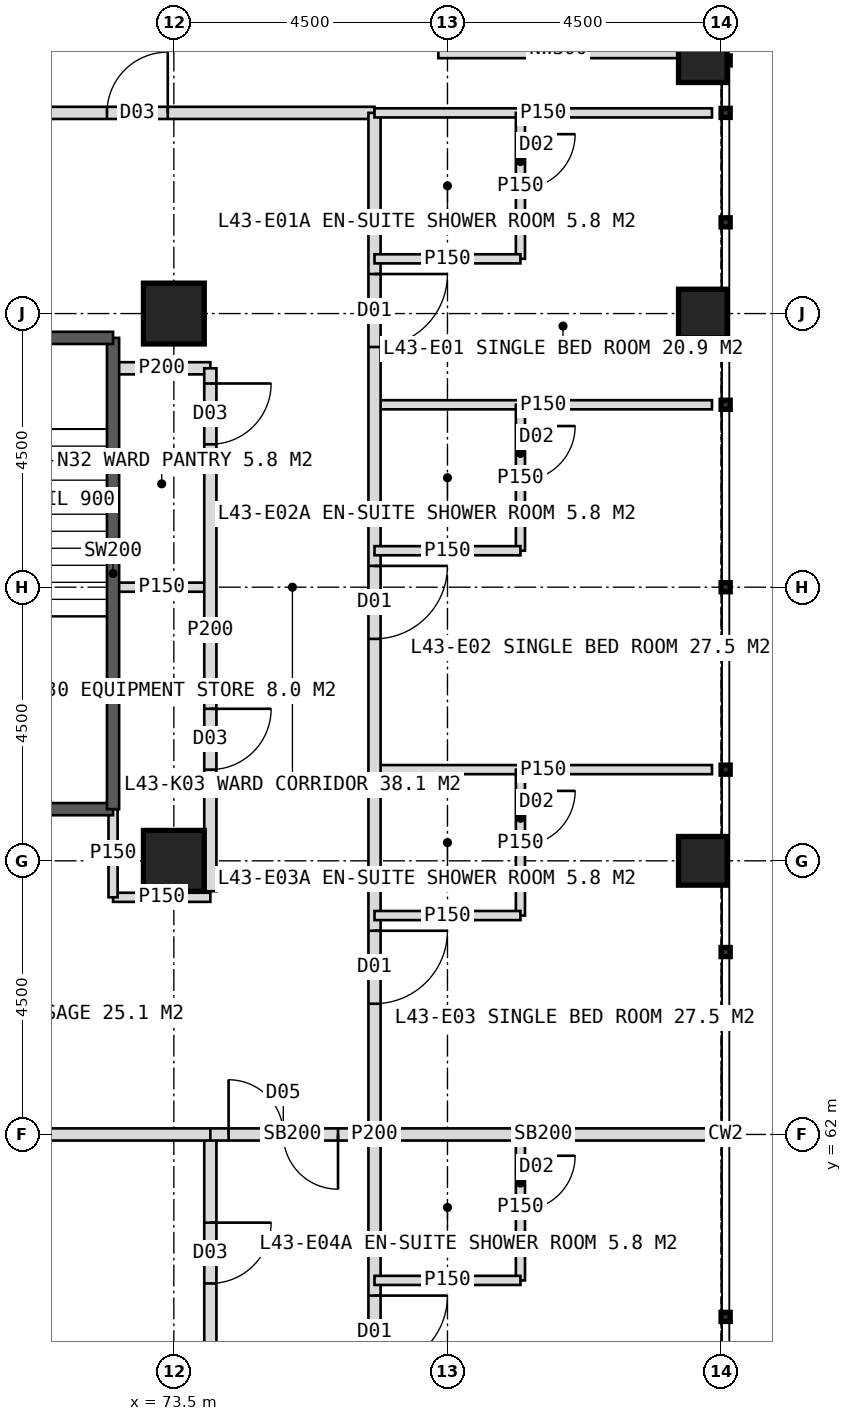
"""IFC4 building model, lengths in metres.
Left out: names, types, materials, properties, quantities, classifications, styles, units other than length and angle.
Written with IfcOpenShell. Run it as: python <this file> out.ifc"""

import sys

from ifc_helpers import new_model, si_unit, direction, frame, frame_2d, origin, origin_2d, place, context, subcontext, project, spatial, rectangle, hollow_rectangle, extrude, element, fill, save


model = new_model("IFC4")
c1 = context("Model", 3, precision=1e-05, world=origin(), true_north=direction((0.0, 1.0)))
c2 = subcontext(c1, "Body", "Model", "MODEL_VIEW")
j1 = project(units=[si_unit("LENGTHUNIT", "METRE"), si_unit("PLANEANGLEUNIT", "RADIAN")], contexts=[c1])
p1 = place(None, origin())
s1 = spatial("IfcSite", under=j1, at=p1, CompositionType="ELEMENT")
p2 = place(p1, origin())
s2 = spatial("IfcBuilding", under=s1, at=p2, CompositionType="ELEMENT")
p3 = place(p2, frame((0.0, 0.0, 181.0)))
s3 = spatial("IfcBuildingStorey", under=s2, at=p3, CompositionType="ELEMENT", Elevation=181.0)
for number, where, z_axis, x_axis in (
    (1, (73.5, 75.5, 0.0), (0.0, 0.0, 1.0), (1.0, 0.0, 0.0)),
    (2, (73.5, 66.5, 0.0), (0.0, 0.0, 1.0), (1.0, 0.0, 0.0)),
):
    element("IfcColumn", number, at=place(p3, frame(where, z_axis=z_axis, x_axis=x_axis)), inside=s3, PredefinedType="COLUMN", context=c2, shape_type="SweptSolid", body=[
        extrude(hollow_rectangle(XDim=1.0, YDim=1.0, WallThickness=0.1, at=origin_2d()), origin(), (0.0, 0.0, 1.0), 4.0),
    ])
for number, where, z_axis, x_axis in (
    (3, (82.2, 66.5, 0.0), (0.0, 0.0, 1.0), (1.0, 0.0, 0.0)),
    (4, (82.2, 75.5, 0.0), (0.0, 0.0, 1.0), (1.0, 0.0, 0.0)),
    (5, (82.2, 79.7, 0.0), (0.0, 0.0, 1.0), (1.0, 0.0, 0.0)),
):
    element("IfcColumn", number, at=place(p3, frame(where, z_axis=z_axis, x_axis=x_axis)), inside=s3, PredefinedType="COLUMN", context=c2, shape_type="SweptSolid", body=[
        extrude(hollow_rectangle(XDim=0.8, YDim=0.8, WallThickness=0.08, at=origin_2d()), origin(), (0.0, 0.0, 1.0), 4.0),
    ])
p4 = place(p3, frame((77.85, 79.85, 0.0), z_axis=(0.0, 0.0, 1.0), x_axis=(1.0, 0.0, 0.0)))
e6 = element("IfcWall", 6, at=p4, inside=s3, PredefinedType="ELEMENTEDWALL", context=c2, shape_type="SweptSolid", body=[
    extrude(rectangle(XDim=3.95, YDim=0.3, at=frame_2d((1.975, 0.0))), origin(), (0.0, 0.0, 1.0), 2.85),
])
p5 = place(p3, frame((43.2, 78.8, 0.0), z_axis=(0.0, 0.0, 1.0), x_axis=(1.0, 0.0, 0.0)))
e7 = element("IfcWall", 7, at=p5, inside=s3, PredefinedType="PARTITIONING", context=c2, shape_type="SweptSolid", body=[
    extrude(rectangle(XDim=33.6, YDim=0.2, at=frame_2d((16.8, 0.0))), origin(), (0.0, 0.0, 1.0), 3.75),
])
p6 = place(p5, frame((2.65, 0.0, 0.0)))
e8 = element("IfcOpeningElement", 8, at=p6, cuts=e7, PredefinedType="OPENING", context=c2, shape_type="SweptSolid", body=[
    extrude(rectangle(XDim=1.2, YDim=2.2, at=frame_2d((0.6, 1.1))), frame((0.0, 0.11, 0.0), z_axis=(0.0, -1.0, 0.0), x_axis=(1.0, 0.0, 0.0)), (0.0, 0.0, 1.0), 0.22),
])
p7 = place(p5, frame((14.05, 0.0, 0.0)))
e9 = element("IfcOpeningElement", 9, at=p7, cuts=e7, PredefinedType="OPENING", context=c2, shape_type="SweptSolid", body=[
    extrude(rectangle(XDim=1.2, YDim=2.2, at=frame_2d((0.6, 1.1))), frame((0.0, 0.11, 0.0), z_axis=(0.0, -1.0, 0.0), x_axis=(1.0, 0.0, 0.0)), (0.0, 0.0, 1.0), 0.22),
])
p8 = place(p5, frame((22.45, 0.0, 0.0)))
e10 = element("IfcOpeningElement", 10, at=p8, cuts=e7, PredefinedType="OPENING", context=c2, shape_type="SweptSolid", body=[
    extrude(rectangle(XDim=1.2, YDim=2.2, at=frame_2d((0.6, 1.1))), frame((0.0, 0.11, 0.0), z_axis=(0.0, -1.0, 0.0), x_axis=(1.0, 0.0, 0.0)), (0.0, 0.0, 1.0), 0.22),
])
p9 = place(p5, frame((29.2, 0.0, 0.0)))
e11 = element("IfcOpeningElement", 11, at=p9, cuts=e7, PredefinedType="OPENING", context=c2, shape_type="SweptSolid", body=[
    extrude(rectangle(XDim=1.0, YDim=2.1, at=frame_2d((0.5, 1.05))), frame((0.0, 0.11, 0.0), z_axis=(0.0, -1.0, 0.0), x_axis=(1.0, 0.0, 0.0)), (0.0, 0.0, 1.0), 0.22),
])
p10 = place(p3, frame((72.5, 74.6, 0.0), z_axis=(0.0, 0.0, 1.0), x_axis=(1.0, 0.0, 0.0)))
e12 = element("IfcWall", 12, at=p10, inside=s3, PredefinedType="PARTITIONING", context=c2, shape_type="SweptSolid", body=[
    extrude(rectangle(XDim=1.6, YDim=0.2, at=frame_2d((0.8, 0.0))), origin(), (0.0, 0.0, 1.0), 3.75),
])
for number, where, z_axis, x_axis in (
    (13, (76.8, 74.0, 0.0), (0.0, 0.0, 1.0), (1.0, 0.0, 0.0)),
    (14, (76.8, 68.0, 0.0), (0.0, 0.0, 1.0), (1.0, 0.0, 0.0)),
):
    element("IfcWall", number, at=place(p3, frame(where, z_axis=z_axis, x_axis=x_axis)), inside=s3, PredefinedType="PARTITIONING", context=c2, shape_type="SweptSolid", body=[
        extrude(rectangle(XDim=5.55, YDim=0.15, at=frame_2d((2.775, 0.0))), origin(), (0.0, 0.0, 1.0), 3.75),
    ])
p11 = place(p3, frame((76.8, 62.0, 0.0), z_axis=(0.0, 0.0, 1.0), x_axis=(1.0, 0.0, 0.0)))
e15 = element("IfcWall", 15, at=p11, inside=s3, PredefinedType="SOLIDWALL", context=c2, shape_type="SweptSolid", body=[
    extrude(rectangle(XDim=5.55, YDim=0.2, at=frame_2d((2.775, 0.0))), origin(), (0.0, 0.0, 1.0), 2.95),
])
p12 = place(p3, frame((76.8, 78.8, 0.0), z_axis=(0.0, 0.0, 1.0), x_axis=(0.0, -1.0, 0.0)))
e16 = element("IfcWall", 16, at=p12, inside=s3, PredefinedType="PARTITIONING", context=c2, shape_type="SweptSolid", body=[
    extrude(rectangle(XDim=33.6, YDim=0.2, at=frame_2d((16.8, 0.0))), origin(), (0.0, 0.0, 1.0), 3.75),
])
p13 = place(p12, frame((2.65, 0.0, 0.0)))
e17 = element("IfcOpeningElement", 17, at=p13, cuts=e16, PredefinedType="OPENING", context=c2, shape_type="SweptSolid", body=[
    extrude(rectangle(XDim=1.2, YDim=2.2, at=frame_2d((0.6, 1.1))), frame((0.0, 0.11, 0.0), z_axis=(0.0, -1.0, 0.0), x_axis=(1.0, 0.0, 0.0)), (0.0, 0.0, 1.0), 0.22),
])
p14 = place(p12, frame((7.45, 0.0, 0.0)))
e18 = element("IfcOpeningElement", 18, at=p14, cuts=e16, PredefinedType="OPENING", context=c2, shape_type="SweptSolid", body=[
    extrude(rectangle(XDim=1.2, YDim=2.2, at=frame_2d((0.6, 1.1))), frame((0.0, 0.11, 0.0), z_axis=(0.0, -1.0, 0.0), x_axis=(1.0, 0.0, 0.0)), (0.0, 0.0, 1.0), 0.22),
])
p15 = place(p12, frame((13.45, 0.0, 0.0)))
e19 = element("IfcOpeningElement", 19, at=p15, cuts=e16, PredefinedType="OPENING", context=c2, shape_type="SweptSolid", body=[
    extrude(rectangle(XDim=1.2, YDim=2.2, at=frame_2d((0.6, 1.1))), frame((0.0, 0.11, 0.0), z_axis=(0.0, -1.0, 0.0), x_axis=(1.0, 0.0, 0.0)), (0.0, 0.0, 1.0), 0.22),
])
p16 = place(p12, frame((19.45, 0.0, 0.0)))
e20 = element("IfcOpeningElement", 20, at=p16, cuts=e16, PredefinedType="OPENING", context=c2, shape_type="SweptSolid", body=[
    extrude(rectangle(XDim=1.2, YDim=2.2, at=frame_2d((0.6, 1.1))), frame((0.0, 0.11, 0.0), z_axis=(0.0, -1.0, 0.0), x_axis=(1.0, 0.0, 0.0)), (0.0, 0.0, 1.0), 0.22),
])
p17 = place(p12, frame((25.45, 0.0, 0.0)))
e21 = element("IfcOpeningElement", 21, at=p17, cuts=e16, PredefinedType="OPENING", context=c2, shape_type="SweptSolid", body=[
    extrude(rectangle(XDim=1.2, YDim=2.2, at=frame_2d((0.6, 1.1))), frame((0.0, 0.11, 0.0), z_axis=(0.0, -1.0, 0.0), x_axis=(1.0, 0.0, 0.0)), (0.0, 0.0, 1.0), 0.22),
])
p18 = place(p3, frame((76.8, 78.8, 0.0), z_axis=(0.0, 0.0, 1.0), x_axis=(1.0, 0.0, 0.0)))
e22 = element("IfcWall", 22, at=p18, inside=s3, PredefinedType="PARTITIONING", context=c2, shape_type="SweptSolid", body=[
    extrude(rectangle(XDim=5.55, YDim=0.15, at=frame_2d((2.775, 0.0))), origin(), (0.0, 0.0, 1.0), 3.75),
])
p19 = place(p3, frame((79.2, 78.8, 0.0), z_axis=(0.0, 0.0, 1.0), x_axis=(0.0, -1.0, 0.0)))
e23 = element("IfcWall", 23, at=p19, inside=s3, PredefinedType="PARTITIONING", context=c2, shape_type="SweptSolid", body=[
    extrude(rectangle(XDim=2.4, YDim=0.15, at=frame_2d((1.2, 0.0))), origin(), (0.0, 0.0, 1.0), 3.75),
])
p20 = place(p19, frame((0.35, 0.0, 0.0)))
e24 = element("IfcOpeningElement", 24, at=p20, cuts=e23, PredefinedType="OPENING", context=c2, shape_type="SweptSolid", body=[
    extrude(rectangle(XDim=0.9, YDim=2.1, at=frame_2d((0.45, 1.05))), frame((0.0, 0.085, 0.0), z_axis=(0.0, -1.0, 0.0), x_axis=(1.0, 0.0, 0.0)), (0.0, 0.0, 1.0), 0.17),
])
p21 = place(p3, frame((76.8, 76.4, 0.0), z_axis=(0.0, 0.0, 1.0), x_axis=(1.0, 0.0, 0.0)))
e25 = element("IfcWall", 25, at=p21, inside=s3, PredefinedType="PARTITIONING", context=c2, shape_type="SweptSolid", body=[
    extrude(rectangle(XDim=2.4, YDim=0.15, at=frame_2d((1.2, 0.0))), origin(), (0.0, 0.0, 1.0), 3.75),
])
p22 = place(p3, frame((79.2, 74.0, 0.0), z_axis=(0.0, 0.0, 1.0), x_axis=(0.0, -1.0, 0.0)))
e26 = element("IfcWall", 26, at=p22, inside=s3, PredefinedType="PARTITIONING", context=c2, shape_type="SweptSolid", body=[
    extrude(rectangle(XDim=2.4, YDim=0.15, at=frame_2d((1.2, 0.0))), origin(), (0.0, 0.0, 1.0), 3.75),
])
p23 = place(p22, frame((0.35, 0.0, 0.0)))
e27 = element("IfcOpeningElement", 27, at=p23, cuts=e26, PredefinedType="OPENING", context=c2, shape_type="SweptSolid", body=[
    extrude(rectangle(XDim=0.9, YDim=2.1, at=frame_2d((0.45, 1.05))), frame((0.0, 0.085, 0.0), z_axis=(0.0, -1.0, 0.0), x_axis=(1.0, 0.0, 0.0)), (0.0, 0.0, 1.0), 0.17),
])
p24 = place(p3, frame((76.8, 71.6, 0.0), z_axis=(0.0, 0.0, 1.0), x_axis=(1.0, 0.0, 0.0)))
e28 = element("IfcWall", 28, at=p24, inside=s3, PredefinedType="PARTITIONING", context=c2, shape_type="SweptSolid", body=[
    extrude(rectangle(XDim=2.4, YDim=0.15, at=frame_2d((1.2, 0.0))), origin(), (0.0, 0.0, 1.0), 3.75),
])
p25 = place(p3, frame((79.2, 68.0, 0.0), z_axis=(0.0, 0.0, 1.0), x_axis=(0.0, -1.0, 0.0)))
e29 = element("IfcWall", 29, at=p25, inside=s3, PredefinedType="PARTITIONING", context=c2, shape_type="SweptSolid", body=[
    extrude(rectangle(XDim=2.4, YDim=0.15, at=frame_2d((1.2, 0.0))), origin(), (0.0, 0.0, 1.0), 3.75),
])
p26 = place(p25, frame((0.35, 0.0, 0.0)))
e30 = element("IfcOpeningElement", 30, at=p26, cuts=e29, PredefinedType="OPENING", context=c2, shape_type="SweptSolid", body=[
    extrude(rectangle(XDim=0.9, YDim=2.1, at=frame_2d((0.45, 1.05))), frame((0.0, 0.085, 0.0), z_axis=(0.0, -1.0, 0.0), x_axis=(1.0, 0.0, 0.0)), (0.0, 0.0, 1.0), 0.17),
])
p27 = place(p3, frame((76.8, 65.6, 0.0), z_axis=(0.0, 0.0, 1.0), x_axis=(1.0, 0.0, 0.0)))
e31 = element("IfcWall", 31, at=p27, inside=s3, PredefinedType="PARTITIONING", context=c2, shape_type="SweptSolid", body=[
    extrude(rectangle(XDim=2.4, YDim=0.15, at=frame_2d((1.2, 0.0))), origin(), (0.0, 0.0, 1.0), 3.75),
])
p28 = place(p3, frame((79.2, 62.0, 0.0), z_axis=(0.0, 0.0, 1.0), x_axis=(0.0, -1.0, 0.0)))
e32 = element("IfcWall", 32, at=p28, inside=s3, PredefinedType="PARTITIONING", context=c2, shape_type="SweptSolid", body=[
    extrude(rectangle(XDim=2.4, YDim=0.15, at=frame_2d((1.2, 0.0))), origin(), (0.0, 0.0, 1.0), 3.75),
])
p29 = place(p28, frame((0.35, 0.0, 0.0)))
e33 = element("IfcOpeningElement", 33, at=p29, cuts=e32, PredefinedType="OPENING", context=c2, shape_type="SweptSolid", body=[
    extrude(rectangle(XDim=0.9, YDim=2.1, at=frame_2d((0.45, 1.05))), frame((0.0, 0.085, 0.0), z_axis=(0.0, -1.0, 0.0), x_axis=(1.0, 0.0, 0.0)), (0.0, 0.0, 1.0), 0.17),
])
p30 = place(p3, frame((76.8, 59.6, 0.0), z_axis=(0.0, 0.0, 1.0), x_axis=(1.0, 0.0, 0.0)))
e34 = element("IfcWall", 34, at=p30, inside=s3, PredefinedType="PARTITIONING", context=c2, shape_type="SweptSolid", body=[
    extrude(rectangle(XDim=2.4, YDim=0.15, at=frame_2d((1.2, 0.0))), origin(), (0.0, 0.0, 1.0), 3.75),
])
p31 = place(p3, frame((72.5, 71.0, 0.0), z_axis=(0.0, 0.0, 1.0), x_axis=(1.0, 0.0, 0.0)))
e35 = element("IfcWall", 35, at=p31, inside=s3, PredefinedType="PARTITIONING", context=c2, shape_type="SweptSolid", body=[
    extrude(rectangle(XDim=1.6, YDim=0.15, at=frame_2d((0.8, 0.0))), origin(), (0.0, 0.0, 1.0), 3.75),
])
p32 = place(p3, frame((74.1, 74.6, 0.0), z_axis=(0.0, 0.0, 1.0), x_axis=(0.0, -1.0, 0.0)))
e36 = element("IfcWall", 36, at=p32, inside=s3, PredefinedType="PARTITIONING", context=c2, shape_type="SweptSolid", body=[
    extrude(rectangle(XDim=8.6, YDim=0.2, at=frame_2d((4.3, 0.0))), origin(), (0.0, 0.0, 1.0), 3.75),
])
p33 = place(p32, frame((0.25, 0.0, 0.0)))
e37 = element("IfcOpeningElement", 37, at=p33, cuts=e36, PredefinedType="OPENING", context=c2, shape_type="SweptSolid", body=[
    extrude(rectangle(XDim=1.0, YDim=2.1, at=frame_2d((0.5, 1.05))), frame((0.0, 0.11, 0.0), z_axis=(0.0, -1.0, 0.0), x_axis=(1.0, 0.0, 0.0)), (0.0, 0.0, 1.0), 0.22),
])
p34 = place(p32, frame((5.6, 0.0, 0.0)))
e38 = element("IfcOpeningElement", 38, at=p34, cuts=e36, PredefinedType="OPENING", context=c2, shape_type="SweptSolid", body=[
    extrude(rectangle(XDim=1.0, YDim=2.1, at=frame_2d((0.5, 1.05))), frame((0.0, 0.11, 0.0), z_axis=(0.0, -1.0, 0.0), x_axis=(1.0, 0.0, 0.0)), (0.0, 0.0, 1.0), 0.22),
])
p35 = place(p3, frame((74.1, 62.0, 0.0), z_axis=(0.0, 0.0, 1.0), x_axis=(0.0, -1.0, 0.0)))
e39 = element("IfcWall", 39, at=p35, inside=s3, PredefinedType="PARTITIONING", context=c2, shape_type="SweptSolid", body=[
    extrude(rectangle(XDim=14.1, YDim=0.2, at=frame_2d((7.05, 0.0))), origin(), (0.0, 0.0, 1.0), 3.75),
])
p36 = place(p35, frame((1.45, 0.0, 0.0)))
e40 = element("IfcOpeningElement", 40, at=p36, cuts=e39, PredefinedType="OPENING", context=c2, shape_type="SweptSolid", body=[
    extrude(rectangle(XDim=1.0, YDim=2.1, at=frame_2d((0.5, 1.05))), frame((0.0, 0.11, 0.0), z_axis=(0.0, -1.0, 0.0), x_axis=(1.0, 0.0, 0.0)), (0.0, 0.0, 1.0), 0.22),
])
p37 = place(p35, frame((11.05, 0.0, 0.0)))
e41 = element("IfcOpeningElement", 41, at=p37, cuts=e39, PredefinedType="OPENING", context=c2, shape_type="SweptSolid", body=[
    extrude(rectangle(XDim=1.0, YDim=2.1, at=frame_2d((0.5, 1.05))), frame((0.0, 0.11, 0.0), z_axis=(0.0, -1.0, 0.0), x_axis=(1.0, 0.0, 0.0)), (0.0, 0.0, 1.0), 0.22),
])
p38 = place(p3, frame((72.5, 65.9, 0.0), z_axis=(0.0, 0.0, 1.0), x_axis=(1.0, 0.0, 0.0)))
e42 = element("IfcWall", 42, at=p38, inside=s3, PredefinedType="PARTITIONING", context=c2, shape_type="SweptSolid", body=[
    extrude(rectangle(XDim=1.6, YDim=0.15, at=frame_2d((0.8, 0.0))), origin(), (0.0, 0.0, 1.0), 3.75),
])
p39 = place(p3, frame((69.0, 62.0, 0.0), z_axis=(0.0, 0.0, 1.0), x_axis=(1.0, 0.0, 0.0)))
e43 = element("IfcWall", 43, at=p39, inside=s3, PredefinedType="SOLIDWALL", context=c2, shape_type="SweptSolid", body=[
    extrude(rectangle(XDim=5.1, YDim=0.2, at=frame_2d((2.55, 0.0))), origin(), (0.0, 0.0, 1.0), 2.95),
])
p40 = place(p3, frame((74.1, 62.0, 0.0), z_axis=(0.0, 0.0, 1.0), x_axis=(1.0, 0.0, 0.0)))
e44 = element("IfcWall", 44, at=p40, inside=s3, PredefinedType="SOLIDWALL", context=c2, shape_type="SweptSolid", body=[
    extrude(rectangle(XDim=2.7, YDim=0.2, at=frame_2d((1.35, 0.0))), origin(), (0.0, 0.0, 1.0), 2.95),
])
p41 = place(p40, frame((0.3, 0.0, 0.0)))
e45 = element("IfcOpeningElement", 45, at=p41, cuts=e44, PredefinedType="OPENING", context=c2, shape_type="SweptSolid", body=[
    extrude(rectangle(XDim=1.8, YDim=2.2, at=frame_2d((0.9, 1.1))), frame((0.0, 0.11, 0.0), z_axis=(0.0, -1.0, 0.0), x_axis=(1.0, 0.0, 0.0)), (0.0, 0.0, 1.0), 0.22),
])
p42 = place(p3, frame((72.5, 65.9, 0.0), z_axis=(0.0, 0.0, 1.0), x_axis=(0.0, 1.0, 0.0)))
e46 = element("IfcWall", 46, at=p42, inside=s3, PredefinedType="PARTITIONING", context=c2, shape_type="SweptSolid", body=[
    extrude(rectangle(XDim=1.45, YDim=0.15, at=frame_2d((0.725, 0.0))), origin(), (0.0, 0.0, 1.0), 3.75),
])
p43 = place(p3, frame((69.0, 67.35, 0.0), z_axis=(0.0, 0.0, 1.0), x_axis=(1.0, 0.0, 0.0)))
e47 = element("IfcWall", 47, at=p43, inside=s3, PredefinedType="SOLIDWALL", context=c2, shape_type="SweptSolid", body=[
    extrude(rectangle(XDim=3.5, YDim=0.2, at=frame_2d((1.75, 0.0))), origin(), (0.0, 0.0, 1.0), 3.75),
])
p44 = place(p3, frame((72.5, 67.35, 0.0), z_axis=(0.0, 0.0, 1.0), x_axis=(0.0, 1.0, 0.0)))
e48 = element("IfcWall", 48, at=p44, inside=s3, PredefinedType="SOLIDWALL", context=c2, shape_type="SweptSolid", body=[
    extrude(rectangle(XDim=7.75, YDim=0.2, at=frame_2d((3.875, 0.0))), origin(), (0.0, 0.0, 1.0), 3.75),
])
p45 = place(p3, frame((69.0, 75.1, 0.0), z_axis=(0.0, 0.0, 1.0), x_axis=(1.0, 0.0, 0.0)))
e49 = element("IfcWall", 49, at=p45, inside=s3, PredefinedType="SOLIDWALL", context=c2, shape_type="SweptSolid", body=[
    extrude(rectangle(XDim=3.5, YDim=0.2, at=frame_2d((1.75, 0.0))), origin(), (0.0, 0.0, 1.0), 3.75),
])
p46 = place(p45, frame((1.15, 0.0, 0.0)))
e50 = element("IfcOpeningElement", 50, at=p46, cuts=e49, PredefinedType="OPENING", context=c2, shape_type="SweptSolid", body=[
    extrude(rectangle(XDim=1.2, YDim=2.1, at=frame_2d((0.6, 1.05))), frame((0.0, 0.11, 0.0), z_axis=(0.0, -1.0, 0.0), x_axis=(1.0, 0.0, 0.0)), (0.0, 0.0, 1.0), 0.22),
])
p47 = place(p9, origin())
e51 = element("IfcDoor", 51, at=p47, inside=s3, OperationType="SINGLE_SWING_RIGHT", PredefinedType="DOOR", context=c2, shape_type="SweptSolid", body=[
    extrude(rectangle(XDim=1.0, YDim=2.1, at=frame_2d((0.5, 1.05))), frame((0.0, 0.025, 0.0), z_axis=(0.0, -1.0, 0.0), x_axis=(1.0, 0.0, 0.0)), (0.0, 0.0, 1.0), 0.05),
])
fill(e11, e51)
p48 = place(p33, origin())
e52 = element("IfcDoor", 52, at=p48, inside=s3, OperationType="SINGLE_SWING_LEFT", PredefinedType="DOOR", context=c2, shape_type="SweptSolid", body=[
    extrude(rectangle(XDim=1.0, YDim=2.1, at=frame_2d((0.5, 1.05))), frame((0.0, 0.025, 0.0), z_axis=(0.0, -1.0, 0.0), x_axis=(1.0, 0.0, 0.0)), (0.0, 0.0, 1.0), 0.05),
])
fill(e37, e52)
p49 = place(p13, origin())
e53 = element("IfcDoor", 53, at=p49, inside=s3, OperationType="SINGLE_SWING_LEFT", PredefinedType="DOOR", context=c2, shape_type="SweptSolid", body=[
    extrude(rectangle(XDim=1.2, YDim=2.2, at=frame_2d((0.6, 1.1))), frame((0.0, 0.025, 0.0), z_axis=(0.0, -1.0, 0.0), x_axis=(1.0, 0.0, 0.0)), (0.0, 0.0, 1.0), 0.05),
])
fill(e17, e53)
p50 = place(p20, origin())
e54 = element("IfcDoor", 54, at=p50, inside=s3, OperationType="SINGLE_SWING_LEFT", PredefinedType="DOOR", context=c2, shape_type="SweptSolid", body=[
    extrude(rectangle(XDim=0.9, YDim=2.1, at=frame_2d((0.45, 1.05))), frame((0.0, 0.025, 0.0), z_axis=(0.0, -1.0, 0.0), x_axis=(1.0, 0.0, 0.0)), (0.0, 0.0, 1.0), 0.05),
])
fill(e24, e54)
p51 = place(p14, origin())
e55 = element("IfcDoor", 55, at=p51, inside=s3, OperationType="SINGLE_SWING_LEFT", PredefinedType="DOOR", context=c2, shape_type="SweptSolid", body=[
    extrude(rectangle(XDim=1.2, YDim=2.2, at=frame_2d((0.6, 1.1))), frame((0.0, 0.025, 0.0), z_axis=(0.0, -1.0, 0.0), x_axis=(1.0, 0.0, 0.0)), (0.0, 0.0, 1.0), 0.05),
])
fill(e18, e55)
p52 = place(p23, origin())
e56 = element("IfcDoor", 56, at=p52, inside=s3, OperationType="SINGLE_SWING_LEFT", PredefinedType="DOOR", context=c2, shape_type="SweptSolid", body=[
    extrude(rectangle(XDim=0.9, YDim=2.1, at=frame_2d((0.45, 1.05))), frame((0.0, 0.025, 0.0), z_axis=(0.0, -1.0, 0.0), x_axis=(1.0, 0.0, 0.0)), (0.0, 0.0, 1.0), 0.05),
])
fill(e27, e56)
p53 = place(p15, origin())
e57 = element("IfcDoor", 57, at=p53, inside=s3, OperationType="SINGLE_SWING_LEFT", PredefinedType="DOOR", context=c2, shape_type="SweptSolid", body=[
    extrude(rectangle(XDim=1.2, YDim=2.2, at=frame_2d((0.6, 1.1))), frame((0.0, 0.025, 0.0), z_axis=(0.0, -1.0, 0.0), x_axis=(1.0, 0.0, 0.0)), (0.0, 0.0, 1.0), 0.05),
])
fill(e19, e57)
p54 = place(p26, origin())
e58 = element("IfcDoor", 58, at=p54, inside=s3, OperationType="SINGLE_SWING_LEFT", PredefinedType="DOOR", context=c2, shape_type="SweptSolid", body=[
    extrude(rectangle(XDim=0.9, YDim=2.1, at=frame_2d((0.45, 1.05))), frame((0.0, 0.025, 0.0), z_axis=(0.0, -1.0, 0.0), x_axis=(1.0, 0.0, 0.0)), (0.0, 0.0, 1.0), 0.05),
])
fill(e30, e58)
p55 = place(p16, origin())
e59 = element("IfcDoor", 59, at=p55, inside=s3, OperationType="SINGLE_SWING_LEFT", PredefinedType="DOOR", context=c2, shape_type="SweptSolid", body=[
    extrude(rectangle(XDim=1.2, YDim=2.2, at=frame_2d((0.6, 1.1))), frame((0.0, 0.025, 0.0), z_axis=(0.0, -1.0, 0.0), x_axis=(1.0, 0.0, 0.0)), (0.0, 0.0, 1.0), 0.05),
])
fill(e20, e59)
p56 = place(p29, origin())
e60 = element("IfcDoor", 60, at=p56, inside=s3, OperationType="SINGLE_SWING_LEFT", PredefinedType="DOOR", context=c2, shape_type="SweptSolid", body=[
    extrude(rectangle(XDim=0.9, YDim=2.1, at=frame_2d((0.45, 1.05))), frame((0.0, 0.025, 0.0), z_axis=(0.0, -1.0, 0.0), x_axis=(1.0, 0.0, 0.0)), (0.0, 0.0, 1.0), 0.05),
])
fill(e33, e60)
p57 = place(p34, origin())
e61 = element("IfcDoor", 61, at=p57, inside=s3, OperationType="SINGLE_SWING_LEFT", PredefinedType="DOOR", context=c2, shape_type="SweptSolid", body=[
    extrude(rectangle(XDim=1.0, YDim=2.1, at=frame_2d((0.5, 1.05))), frame((0.0, 0.025, 0.0), z_axis=(0.0, -1.0, 0.0), x_axis=(1.0, 0.0, 0.0)), (0.0, 0.0, 1.0), 0.05),
])
fill(e38, e61)
p58 = place(p36, origin())
e62 = element("IfcDoor", 62, at=p58, inside=s3, OperationType="SINGLE_SWING_LEFT", PredefinedType="DOOR", context=c2, shape_type="SweptSolid", body=[
    extrude(rectangle(XDim=1.0, YDim=2.1, at=frame_2d((0.5, 1.05))), frame((0.0, 0.025, 0.0), z_axis=(0.0, -1.0, 0.0), x_axis=(1.0, 0.0, 0.0)), (0.0, 0.0, 1.0), 0.05),
])
fill(e40, e62)
p59 = place(p41, origin())
e63 = element("IfcDoor", 63, at=p59, inside=s3, OperationType="DOUBLE_DOOR_DOUBLE_SWING", PredefinedType="DOOR", context=c2, shape_type="SweptSolid", body=[
    extrude(rectangle(XDim=1.8, YDim=2.2, at=frame_2d((0.9, 1.1))), frame((0.0, 0.025, 0.0), z_axis=(0.0, -1.0, 0.0), x_axis=(1.0, 0.0, 0.0)), (0.0, 0.0, 1.0), 0.05),
])
fill(e45, e63)
save(model, sys.argv[1])
